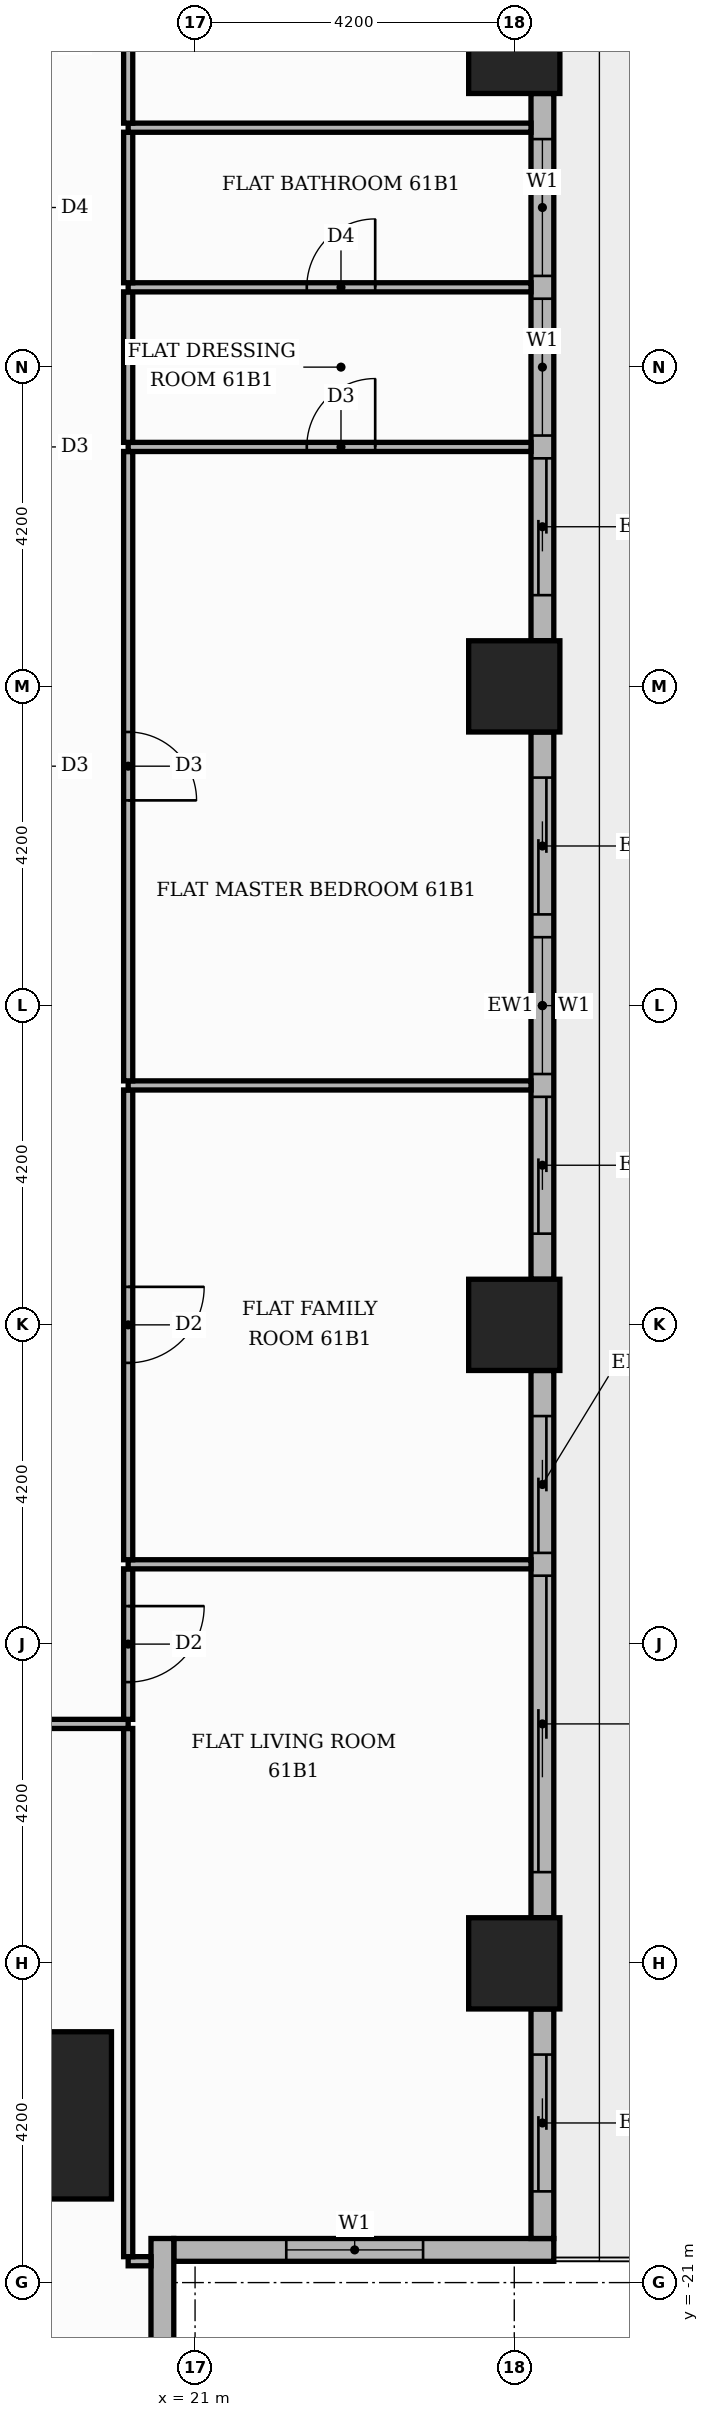
"""IFC4 building model, lengths in metres.
Left out: names, types, materials, properties, quantities, classifications, styles, units other than length and angle.
Written with IfcOpenShell. Run it as: python <this file> out.ifc"""

import sys

from ifc_helpers import new_model, si_unit, direction, frame, frame_2d, origin, origin_2d, place, context, subcontext, project, spatial, rectangle, extrude, element, fill, save


model = new_model("IFC4")
c1 = context("Model", 3, precision=1e-05, world=origin(), true_north=direction((0.0, 1.0)))
c2 = subcontext(c1, "Body", "Model", "MODEL_VIEW")
j1 = project(units=[si_unit("LENGTHUNIT", "METRE"), si_unit("PLANEANGLEUNIT", "RADIAN")], contexts=[c1])
p1 = place(None, origin())
s1 = spatial("IfcSite", under=j1, at=p1, CompositionType="ELEMENT")
p2 = place(p1, origin())
s2 = spatial("IfcBuilding", under=s1, at=p2, CompositionType="ELEMENT")
p3 = place(p2, frame((0.0, 0.0, 256.2)))
s3 = spatial("IfcBuildingStorey", under=s2, at=p3, CompositionType="ELEMENT", Elevation=256.2)
p4 = place(p3, frame((18.8, -18.8, 0.0), z_axis=(0.0, 0.0, 1.0), x_axis=(1.0, 0.0, 0.0)))
e1 = element("IfcColumn", 1, at=p4, inside=s3, PredefinedType="COLUMN", context=c2, shape_type="SweptSolid", body=[
    extrude(rectangle(XDim=2.2, YDim=2.2, at=origin_2d()), origin(), (0.0, 0.0, 1.0), 3.9),
])
for number, where, z_axis, x_axis in (
    (2, (25.2, 0.0, 0.0), (0.0, 0.0, 1.0), (1.0, 0.0, 0.0)),
    (3, (25.2, 8.4, 0.0), (0.0, 0.0, 1.0), (1.0, 0.0, 0.0)),
    (4, (25.2, -8.4, 0.0), (0.0, 0.0, 1.0), (1.0, 0.0, 0.0)),
    (5, (25.2, -16.8, 0.0), (0.0, 0.0, 1.0), (1.0, 0.0, 0.0)),
):
    element("IfcColumn", number, at=place(p3, frame(where, z_axis=z_axis, x_axis=x_axis)), inside=s3, PredefinedType="COLUMN", context=c2, shape_type="SweptSolid", body=[
        extrude(rectangle(XDim=1.2, YDim=1.2, at=origin_2d()), origin(), (0.0, 0.0, 1.0), 3.9),
    ])
p5 = place(p3, frame((20.72, -20.57, 0.0), z_axis=(0.0, 0.0, 1.0), x_axis=(1.0, 0.0, 0.0)))
e6 = element("IfcWall", 6, at=p5, inside=s3, PredefinedType="STANDARD", context=c2, shape_type="SweptSolid", body=[
    extrude(rectangle(XDim=5.0, YDim=0.3, at=frame_2d((2.5, 0.0))), origin(), (0.0, 0.0, 1.0), 3.48),
])
p6 = place(p5, frame((1.48, 0.0, 0.9)))
e7 = element("IfcOpeningElement", 7, at=p6, cuts=e6, PredefinedType="OPENING", context=c2, shape_type="SweptSolid", body=[
    extrude(rectangle(XDim=1.8, YDim=2.1, at=frame_2d((0.9, 1.05))), frame((0.0, 0.16, 0.0), z_axis=(0.0, -1.0, 0.0), x_axis=(1.0, 0.0, 0.0)), (0.0, 0.0, 1.0), 0.32),
])
p7 = place(p3, frame((25.57, -20.42, 0.0), z_axis=(0.0, 0.0, 1.0), x_axis=(0.0, 1.0, 0.0)))
e8 = element("IfcWall", 8, at=p7, inside=s3, PredefinedType="STANDARD", context=c2, shape_type="SweptSolid", body=[
    extrude(rectangle(XDim=3.02, YDim=0.3, at=frame_2d((1.51, 0.0))), origin(), (0.0, 0.0, 1.0), 3.48),
])
p8 = place(p7, frame((0.62, 0.0, 0.0)))
e9 = element("IfcOpeningElement", 9, at=p8, cuts=e8, PredefinedType="OPENING", context=c2, shape_type="SweptSolid", body=[
    extrude(rectangle(XDim=1.8, YDim=2.4, at=frame_2d((0.9, 1.2))), frame((0.0, 0.16, 0.0), z_axis=(0.0, -1.0, 0.0), x_axis=(1.0, 0.0, 0.0)), (0.0, 0.0, 1.0), 0.32),
])
p9 = place(p3, frame((25.57, -16.2, 0.0), z_axis=(0.0, 0.0, 1.0), x_axis=(0.0, 1.0, 0.0)))
e10 = element("IfcWall", 10, at=p9, inside=s3, PredefinedType="STANDARD", context=c2, shape_type="SweptSolid", body=[
    extrude(rectangle(XDim=7.2, YDim=0.3, at=frame_2d((3.6, 0.0))), origin(), (0.0, 0.0, 1.0), 3.48),
])
p10 = place(p9, frame((0.6, 0.0, 0.0)))
e11 = element("IfcOpeningElement", 11, at=p10, cuts=e10, PredefinedType="OPENING", context=c2, shape_type="SweptSolid", body=[
    extrude(rectangle(XDim=3.9, YDim=2.4, at=frame_2d((1.95, 1.2))), frame((0.0, 0.16, 0.0), z_axis=(0.0, -1.0, 0.0), x_axis=(1.0, 0.0, 0.0)), (0.0, 0.0, 1.0), 0.32),
])
p11 = place(p9, frame((4.8, 0.0, 0.0)))
e12 = element("IfcOpeningElement", 12, at=p11, cuts=e10, PredefinedType="OPENING", context=c2, shape_type="SweptSolid", body=[
    extrude(rectangle(XDim=1.8, YDim=2.4, at=frame_2d((0.9, 1.2))), frame((0.0, 0.16, 0.0), z_axis=(0.0, -1.0, 0.0), x_axis=(1.0, 0.0, 0.0)), (0.0, 0.0, 1.0), 0.32),
])
p12 = place(p3, frame((25.57, -7.8, 0.0), z_axis=(0.0, 0.0, 1.0), x_axis=(0.0, 1.0, 0.0)))
e13 = element("IfcWall", 13, at=p12, inside=s3, PredefinedType="STANDARD", context=c2, shape_type="SweptSolid", body=[
    extrude(rectangle(XDim=7.2, YDim=0.3, at=frame_2d((3.6, 0.0))), origin(), (0.0, 0.0, 1.0), 3.48),
])
p13 = place(p12, frame((0.6, 0.0, 0.0)))
e14 = element("IfcOpeningElement", 14, at=p13, cuts=e13, PredefinedType="OPENING", context=c2, shape_type="SweptSolid", body=[
    extrude(rectangle(XDim=1.8, YDim=2.4, at=frame_2d((0.9, 1.2))), frame((0.0, 0.16, 0.0), z_axis=(0.0, -1.0, 0.0), x_axis=(1.0, 0.0, 0.0)), (0.0, 0.0, 1.0), 0.32),
])
p14 = place(p12, frame((2.7, 0.0, 0.9)))
e15 = element("IfcOpeningElement", 15, at=p14, cuts=e13, PredefinedType="OPENING", context=c2, shape_type="SweptSolid", body=[
    extrude(rectangle(XDim=1.8, YDim=2.1, at=frame_2d((0.9, 1.05))), frame((0.0, 0.16, 0.0), z_axis=(0.0, -1.0, 0.0), x_axis=(1.0, 0.0, 0.0)), (0.0, 0.0, 1.0), 0.32),
])
p15 = place(p12, frame((4.8, 0.0, 0.0)))
e16 = element("IfcOpeningElement", 16, at=p15, cuts=e13, PredefinedType="OPENING", context=c2, shape_type="SweptSolid", body=[
    extrude(rectangle(XDim=1.8, YDim=2.4, at=frame_2d((0.9, 1.2))), frame((0.0, 0.16, 0.0), z_axis=(0.0, -1.0, 0.0), x_axis=(1.0, 0.0, 0.0)), (0.0, 0.0, 1.0), 0.32),
])
p16 = place(p3, frame((25.57, 0.6, 0.0), z_axis=(0.0, 0.0, 1.0), x_axis=(0.0, 1.0, 0.0)))
e17 = element("IfcWall", 17, at=p16, inside=s3, PredefinedType="STANDARD", context=c2, shape_type="SweptSolid", body=[
    extrude(rectangle(XDim=7.2, YDim=0.3, at=frame_2d((3.6, 0.0))), origin(), (0.0, 0.0, 1.0), 3.48),
])
p17 = place(p16, frame((0.6, 0.0, 0.0)))
e18 = element("IfcOpeningElement", 18, at=p17, cuts=e17, PredefinedType="OPENING", context=c2, shape_type="SweptSolid", body=[
    extrude(rectangle(XDim=1.8, YDim=2.4, at=frame_2d((0.9, 1.2))), frame((0.0, 0.16, 0.0), z_axis=(0.0, -1.0, 0.0), x_axis=(1.0, 0.0, 0.0)), (0.0, 0.0, 1.0), 0.32),
])
p18 = place(p16, frame((2.7, 0.0, 0.9)))
e19 = element("IfcOpeningElement", 19, at=p18, cuts=e17, PredefinedType="OPENING", context=c2, shape_type="SweptSolid", body=[
    extrude(rectangle(XDim=1.8, YDim=2.1, at=frame_2d((0.9, 1.05))), frame((0.0, 0.16, 0.0), z_axis=(0.0, -1.0, 0.0), x_axis=(1.0, 0.0, 0.0)), (0.0, 0.0, 1.0), 0.32),
])
p19 = place(p16, frame((4.8, 0.0, 0.9)))
e20 = element("IfcOpeningElement", 20, at=p19, cuts=e17, PredefinedType="OPENING", context=c2, shape_type="SweptSolid", body=[
    extrude(rectangle(XDim=1.8, YDim=2.1, at=frame_2d((0.9, 1.05))), frame((0.0, 0.16, 0.0), z_axis=(0.0, -1.0, 0.0), x_axis=(1.0, 0.0, 0.0)), (0.0, 0.0, 1.0), 0.32),
])
p20 = place(p3, frame((20.57, -25.42, 0.0), z_axis=(0.0, 0.0, 1.0), x_axis=(0.0, 1.0, 0.0)))
e21 = element("IfcWall", 21, at=p20, inside=s3, PredefinedType="STANDARD", context=c2, shape_type="SweptSolid", body=[
    extrude(rectangle(XDim=5.0, YDim=0.3, at=frame_2d((2.5, 0.0))), origin(), (0.0, 0.0, 1.0), 3.48),
])
p21 = place(p20, frame((1.42, 0.0, 0.9)))
e22 = element("IfcOpeningElement", 22, at=p21, cuts=e21, PredefinedType="OPENING", context=c2, shape_type="SweptSolid", body=[
    extrude(rectangle(XDim=1.8, YDim=2.1, at=frame_2d((0.9, 1.05))), frame((0.0, 0.16, 0.0), z_axis=(0.0, -1.0, 0.0), x_axis=(1.0, 0.0, 0.0)), (0.0, 0.0, 1.0), 0.32),
])
p22 = place(p3, frame((20.12, -20.719, 0.0), z_axis=(0.0, 0.0, 1.0), x_axis=(1.0, 0.0, 0.0)))
e23 = element("IfcWall", 23, at=p22, inside=s3, PredefinedType="PARTITIONING", context=c2, shape_type="SweptSolid", body=[
    extrude(rectangle(XDim=0.301, YDim=0.12, at=frame_2d((0.15, 0.0))), origin(), (0.0, 0.0, 1.0), 3.48),
])
p23 = place(p3, frame((20.12, -20.659, 0.0), z_axis=(0.0, 0.0, 1.0), x_axis=(0.0, 1.0, 0.0)))
e24 = element("IfcWall", 24, at=p23, inside=s3, PredefinedType="PARTITIONING", context=c2, shape_type="SweptSolid", body=[
    extrude(rectangle(XDim=6.949, YDim=0.12, at=frame_2d((3.475, 0.0))), origin(), (0.0, 0.0, 1.0), 3.48),
])
p24 = place(p3, frame((13.65, -13.65, 0.0), z_axis=(0.0, 0.0, 1.0), x_axis=(1.0, 0.0, 0.0)))
e25 = element("IfcWall", 25, at=p24, inside=s3, PredefinedType="PARTITIONING", context=c2, shape_type="SweptSolid", body=[
    extrude(rectangle(XDim=6.47, YDim=0.12, at=frame_2d((3.235, 0.0))), origin(), (0.0, 0.0, 1.0), 3.48),
])
p25 = place(p24, frame((2.785, 0.0, 0.0)))
e26 = element("IfcOpeningElement", 26, at=p25, cuts=e25, PredefinedType="OPENING", context=c2, shape_type="SweptSolid", body=[
    extrude(rectangle(XDim=0.9, YDim=2.1, at=frame_2d((0.45, 1.05))), frame((0.0, 0.07, 0.0), z_axis=(0.0, -1.0, 0.0), x_axis=(1.0, 0.0, 0.0)), (0.0, 0.0, 1.0), 0.14),
])
p26 = place(p3, frame((20.12, -13.59, 0.0), z_axis=(0.0, 0.0, 1.0), x_axis=(0.0, 1.0, 0.0)))
e27 = element("IfcWall", 27, at=p26, inside=s3, PredefinedType="PARTITIONING", context=c2, shape_type="SweptSolid", body=[
    extrude(rectangle(XDim=1.98, YDim=0.12, at=frame_2d((0.99, 0.0))), origin(), (0.0, 0.0, 1.0), 3.48),
])
p27 = place(p26, frame((0.49, 0.0, 0.0)))
e28 = element("IfcOpeningElement", 28, at=p27, cuts=e27, PredefinedType="OPENING", context=c2, shape_type="SweptSolid", body=[
    extrude(rectangle(XDim=1.0, YDim=2.1, at=frame_2d((0.5, 1.05))), frame((0.0, 0.07, 0.0), z_axis=(0.0, -1.0, 0.0), x_axis=(1.0, 0.0, 0.0)), (0.0, 0.0, 1.0), 0.14),
])
p28 = place(p3, frame((20.12, -11.55, 0.0), z_axis=(0.0, 0.0, 1.0), x_axis=(1.0, 0.0, 0.0)))
e29 = element("IfcWall", 29, at=p28, inside=s3, PredefinedType="PARTITIONING", context=c2, shape_type="SweptSolid", body=[
    extrude(rectangle(XDim=5.3, YDim=0.12, at=frame_2d((2.65, 0.0))), origin(), (0.0, 0.0, 1.0), 3.48),
])
p29 = place(p3, frame((20.12, -11.49, 0.0), z_axis=(0.0, 0.0, 1.0), x_axis=(0.0, 1.0, 0.0)))
e30 = element("IfcWall", 30, at=p29, inside=s3, PredefinedType="PARTITIONING", context=c2, shape_type="SweptSolid", body=[
    extrude(rectangle(XDim=6.18, YDim=0.12, at=frame_2d((3.09, 0.0))), origin(), (0.0, 0.0, 1.0), 3.48),
])
p30 = place(p29, frame((2.59, 0.0, 0.0)))
e31 = element("IfcOpeningElement", 31, at=p30, cuts=e30, PredefinedType="OPENING", context=c2, shape_type="SweptSolid", body=[
    extrude(rectangle(XDim=1.0, YDim=2.1, at=frame_2d((0.5, 1.05))), frame((0.0, 0.07, 0.0), z_axis=(0.0, -1.0, 0.0), x_axis=(1.0, 0.0, 0.0)), (0.0, 0.0, 1.0), 0.14),
])
p31 = place(p3, frame((20.12, -5.25, 0.0), z_axis=(0.0, 0.0, 1.0), x_axis=(1.0, 0.0, 0.0)))
e32 = element("IfcWall", 32, at=p31, inside=s3, PredefinedType="PARTITIONING", context=c2, shape_type="SweptSolid", body=[
    extrude(rectangle(XDim=5.3, YDim=0.12, at=frame_2d((2.65, 0.0))), origin(), (0.0, 0.0, 1.0), 3.48),
])
p32 = place(p3, frame((20.12, -5.19, 0.0), z_axis=(0.0, 0.0, 1.0), x_axis=(0.0, 1.0, 0.0)))
e33 = element("IfcWall", 33, at=p32, inside=s3, PredefinedType="PARTITIONING", context=c2, shape_type="SweptSolid", body=[
    extrude(rectangle(XDim=8.28, YDim=0.12, at=frame_2d((4.14, 0.0))), origin(), (0.0, 0.0, 1.0), 3.48),
])
p33 = place(p32, frame((3.69, 0.0, 0.0)))
e34 = element("IfcOpeningElement", 34, at=p33, cuts=e33, PredefinedType="OPENING", context=c2, shape_type="SweptSolid", body=[
    extrude(rectangle(XDim=0.9, YDim=2.1, at=frame_2d((0.45, 1.05))), frame((0.0, 0.07, 0.0), z_axis=(0.0, -1.0, 0.0), x_axis=(1.0, 0.0, 0.0)), (0.0, 0.0, 1.0), 0.14),
])
p34 = place(p3, frame((20.12, 3.15, 0.0), z_axis=(0.0, 0.0, 1.0), x_axis=(1.0, 0.0, 0.0)))
e35 = element("IfcWall", 35, at=p34, inside=s3, PredefinedType="PARTITIONING", context=c2, shape_type="SweptSolid", body=[
    extrude(rectangle(XDim=5.3, YDim=0.12, at=frame_2d((2.65, 0.0))), origin(), (0.0, 0.0, 1.0), 3.48),
])
p35 = place(p34, frame((2.35, 0.0, 0.0)))
e36 = element("IfcOpeningElement", 36, at=p35, cuts=e35, PredefinedType="OPENING", context=c2, shape_type="SweptSolid", body=[
    extrude(rectangle(XDim=0.9, YDim=2.1, at=frame_2d((0.45, 1.05))), frame((0.0, 0.07, 0.0), z_axis=(0.0, -1.0, 0.0), x_axis=(1.0, 0.0, 0.0)), (0.0, 0.0, 1.0), 0.14),
])
p36 = place(p3, frame((20.12, 3.21, 0.0), z_axis=(0.0, 0.0, 1.0), x_axis=(0.0, 1.0, 0.0)))
e37 = element("IfcWall", 37, at=p36, inside=s3, PredefinedType="PARTITIONING", context=c2, shape_type="SweptSolid", body=[
    extrude(rectangle(XDim=1.98, YDim=0.12, at=frame_2d((0.99, 0.0))), origin(), (0.0, 0.0, 1.0), 3.48),
])
p37 = place(p3, frame((20.12, 5.25, 0.0), z_axis=(0.0, 0.0, 1.0), x_axis=(1.0, 0.0, 0.0)))
e38 = element("IfcWall", 38, at=p37, inside=s3, PredefinedType="PARTITIONING", context=c2, shape_type="SweptSolid", body=[
    extrude(rectangle(XDim=5.3, YDim=0.12, at=frame_2d((2.65, 0.0))), origin(), (0.0, 0.0, 1.0), 3.48),
])
p38 = place(p37, frame((2.35, 0.0, 0.0)))
e39 = element("IfcOpeningElement", 39, at=p38, cuts=e38, PredefinedType="OPENING", context=c2, shape_type="SweptSolid", body=[
    extrude(rectangle(XDim=0.9, YDim=2.1, at=frame_2d((0.45, 1.05))), frame((0.0, 0.07, 0.0), z_axis=(0.0, -1.0, 0.0), x_axis=(1.0, 0.0, 0.0)), (0.0, 0.0, 1.0), 0.14),
])
p39 = place(p3, frame((20.12, 5.31, 0.0), z_axis=(0.0, 0.0, 1.0), x_axis=(0.0, 1.0, 0.0)))
e40 = element("IfcWall", 40, at=p39, inside=s3, PredefinedType="PARTITIONING", context=c2, shape_type="SweptSolid", body=[
    extrude(rectangle(XDim=1.98, YDim=0.12, at=frame_2d((0.99, 0.0))), origin(), (0.0, 0.0, 1.0), 3.48),
])
p40 = place(p3, frame((20.12, 7.35, 0.0), z_axis=(0.0, 0.0, 1.0), x_axis=(1.0, 0.0, 0.0)))
e41 = element("IfcWall", 41, at=p40, inside=s3, PredefinedType="PARTITIONING", context=c2, shape_type="SweptSolid", body=[
    extrude(rectangle(XDim=5.3, YDim=0.12, at=frame_2d((2.65, 0.0))), origin(), (0.0, 0.0, 1.0), 3.48),
])
p41 = place(p3, frame((20.12, 7.41, 0.0), z_axis=(0.0, 0.0, 1.0), x_axis=(0.0, 1.0, 0.0)))
e42 = element("IfcWall", 42, at=p41, inside=s3, PredefinedType="PARTITIONING", context=c2, shape_type="SweptSolid", body=[
    extrude(rectangle(XDim=4.08, YDim=0.12, at=frame_2d((2.04, 0.0))), origin(), (0.0, 0.0, 1.0), 3.48),
])
p42 = place(p41, frame((1.59, 0.0, 0.0)))
e43 = element("IfcOpeningElement", 43, at=p42, cuts=e42, PredefinedType="OPENING", context=c2, shape_type="SweptSolid", body=[
    extrude(rectangle(XDim=0.9, YDim=2.1, at=frame_2d((0.45, 1.05))), frame((0.0, 0.07, 0.0), z_axis=(0.0, -1.0, 0.0), x_axis=(1.0, 0.0, 0.0)), (0.0, 0.0, 1.0), 0.14),
])
p43 = place(p6, origin())
e44 = element("IfcWindow", 44, at=p43, inside=s3, PartitioningType="SINGLE_PANEL", PredefinedType="WINDOW", context=c2, shape_type="SweptSolid", body=[
    extrude(rectangle(XDim=1.8, YDim=2.1, at=frame_2d((0.9, 1.05))), frame((0.0, 0.03, 0.0), z_axis=(0.0, -1.0, 0.0), x_axis=(1.0, 0.0, 0.0)), (0.0, 0.0, 1.0), 0.06),
])
fill(e7, e44)
p44 = place(p8, origin())
e45 = element("IfcDoor", 45, at=p44, inside=s3, OperationType="SLIDING_TO_RIGHT", PredefinedType="DOOR", context=c2, shape_type="SweptSolid", body=[
    extrude(rectangle(XDim=1.8, YDim=2.4, at=frame_2d((0.9, 1.2))), frame((0.0, 0.025, 0.0), z_axis=(0.0, -1.0, 0.0), x_axis=(1.0, 0.0, 0.0)), (0.0, 0.0, 1.0), 0.05),
])
fill(e9, e45)
p45 = place(p10, origin())
e46 = element("IfcDoor", 46, at=p45, inside=s3, OperationType="SLIDING_TO_LEFT", PredefinedType="DOOR", context=c2, shape_type="SweptSolid", body=[
    extrude(rectangle(XDim=3.9, YDim=2.4, at=frame_2d((1.95, 1.2))), frame((0.0, 0.025, 0.0), z_axis=(0.0, -1.0, 0.0), x_axis=(1.0, 0.0, 0.0)), (0.0, 0.0, 1.0), 0.05),
])
fill(e11, e46)
p46 = place(p11, origin())
e47 = element("IfcDoor", 47, at=p46, inside=s3, OperationType="SLIDING_TO_RIGHT", PredefinedType="DOOR", context=c2, shape_type="SweptSolid", body=[
    extrude(rectangle(XDim=1.8, YDim=2.4, at=frame_2d((0.9, 1.2))), frame((0.0, 0.025, 0.0), z_axis=(0.0, -1.0, 0.0), x_axis=(1.0, 0.0, 0.0)), (0.0, 0.0, 1.0), 0.05),
])
fill(e12, e47)
p47 = place(p13, origin())
e48 = element("IfcDoor", 48, at=p47, inside=s3, OperationType="SLIDING_TO_LEFT", PredefinedType="DOOR", context=c2, shape_type="SweptSolid", body=[
    extrude(rectangle(XDim=1.8, YDim=2.4, at=frame_2d((0.9, 1.2))), frame((0.0, 0.025, 0.0), z_axis=(0.0, -1.0, 0.0), x_axis=(1.0, 0.0, 0.0)), (0.0, 0.0, 1.0), 0.05),
])
fill(e14, e48)
p48 = place(p14, origin())
e49 = element("IfcWindow", 49, at=p48, inside=s3, PartitioningType="SINGLE_PANEL", PredefinedType="WINDOW", context=c2, shape_type="SweptSolid", body=[
    extrude(rectangle(XDim=1.8, YDim=2.1, at=frame_2d((0.9, 1.05))), frame((0.0, 0.03, 0.0), z_axis=(0.0, -1.0, 0.0), x_axis=(1.0, 0.0, 0.0)), (0.0, 0.0, 1.0), 0.06),
])
fill(e15, e49)
p49 = place(p15, origin())
e50 = element("IfcDoor", 50, at=p49, inside=s3, OperationType="SLIDING_TO_RIGHT", PredefinedType="DOOR", context=c2, shape_type="SweptSolid", body=[
    extrude(rectangle(XDim=1.8, YDim=2.4, at=frame_2d((0.9, 1.2))), frame((0.0, 0.025, 0.0), z_axis=(0.0, -1.0, 0.0), x_axis=(1.0, 0.0, 0.0)), (0.0, 0.0, 1.0), 0.05),
])
fill(e16, e50)
p50 = place(p17, origin())
e51 = element("IfcDoor", 51, at=p50, inside=s3, OperationType="SLIDING_TO_LEFT", PredefinedType="DOOR", context=c2, shape_type="SweptSolid", body=[
    extrude(rectangle(XDim=1.8, YDim=2.4, at=frame_2d((0.9, 1.2))), frame((0.0, 0.025, 0.0), z_axis=(0.0, -1.0, 0.0), x_axis=(1.0, 0.0, 0.0)), (0.0, 0.0, 1.0), 0.05),
])
fill(e18, e51)
p51 = place(p18, origin())
e52 = element("IfcWindow", 52, at=p51, inside=s3, PartitioningType="SINGLE_PANEL", PredefinedType="WINDOW", context=c2, shape_type="SweptSolid", body=[
    extrude(rectangle(XDim=1.8, YDim=2.1, at=frame_2d((0.9, 1.05))), frame((0.0, 0.03, 0.0), z_axis=(0.0, -1.0, 0.0), x_axis=(1.0, 0.0, 0.0)), (0.0, 0.0, 1.0), 0.06),
])
fill(e19, e52)
p52 = place(p19, origin())
e53 = element("IfcWindow", 53, at=p52, inside=s3, PartitioningType="SINGLE_PANEL", PredefinedType="WINDOW", context=c2, shape_type="SweptSolid", body=[
    extrude(rectangle(XDim=1.8, YDim=2.1, at=frame_2d((0.9, 1.05))), frame((0.0, 0.03, 0.0), z_axis=(0.0, -1.0, 0.0), x_axis=(1.0, 0.0, 0.0)), (0.0, 0.0, 1.0), 0.06),
])
fill(e20, e53)
p53 = place(p27, frame((1.0, 0.0, 0.0), z_axis=(0.0, 0.0, 1.0), x_axis=(-1.0, 0.0, 0.0)))
e54 = element("IfcDoor", 54, at=p53, inside=s3, OperationType="SINGLE_SWING_RIGHT", PredefinedType="DOOR", context=c2, shape_type="SweptSolid", body=[
    extrude(rectangle(XDim=1.0, YDim=2.1, at=frame_2d((0.5, 1.05))), frame((0.0, 0.025, 0.0), z_axis=(0.0, -1.0, 0.0), x_axis=(1.0, 0.0, 0.0)), (0.0, 0.0, 1.0), 0.05),
])
fill(e28, e54)
p54 = place(p30, frame((1.0, 0.0, 0.0), z_axis=(0.0, 0.0, 1.0), x_axis=(-1.0, 0.0, 0.0)))
e55 = element("IfcDoor", 55, at=p54, inside=s3, OperationType="SINGLE_SWING_RIGHT", PredefinedType="DOOR", context=c2, shape_type="SweptSolid", body=[
    extrude(rectangle(XDim=1.0, YDim=2.1, at=frame_2d((0.5, 1.05))), frame((0.0, 0.025, 0.0), z_axis=(0.0, -1.0, 0.0), x_axis=(1.0, 0.0, 0.0)), (0.0, 0.0, 1.0), 0.05),
])
fill(e31, e55)
p55 = place(p33, frame((0.9, 0.0, 0.0), z_axis=(0.0, 0.0, 1.0), x_axis=(-1.0, 0.0, 0.0)))
e56 = element("IfcDoor", 56, at=p55, inside=s3, OperationType="SINGLE_SWING_LEFT", PredefinedType="DOOR", context=c2, shape_type="SweptSolid", body=[
    extrude(rectangle(XDim=0.9, YDim=2.1, at=frame_2d((0.45, 1.05))), frame((0.0, 0.025, 0.0), z_axis=(0.0, -1.0, 0.0), x_axis=(1.0, 0.0, 0.0)), (0.0, 0.0, 1.0), 0.05),
])
fill(e34, e56)
p56 = place(p35, origin())
e57 = element("IfcDoor", 57, at=p56, inside=s3, OperationType="SINGLE_SWING_RIGHT", PredefinedType="DOOR", context=c2, shape_type="SweptSolid", body=[
    extrude(rectangle(XDim=0.9, YDim=2.1, at=frame_2d((0.45, 1.05))), frame((0.0, 0.025, 0.0), z_axis=(0.0, -1.0, 0.0), x_axis=(1.0, 0.0, 0.0)), (0.0, 0.0, 1.0), 0.05),
])
fill(e36, e57)
p57 = place(p38, origin())
e58 = element("IfcDoor", 58, at=p57, inside=s3, OperationType="SINGLE_SWING_RIGHT", PredefinedType="DOOR", context=c2, shape_type="SweptSolid", body=[
    extrude(rectangle(XDim=0.9, YDim=2.1, at=frame_2d((0.45, 1.05))), frame((0.0, 0.025, 0.0), z_axis=(0.0, -1.0, 0.0), x_axis=(1.0, 0.0, 0.0)), (0.0, 0.0, 1.0), 0.05),
])
fill(e39, e58)
save(model, sys.argv[1])
